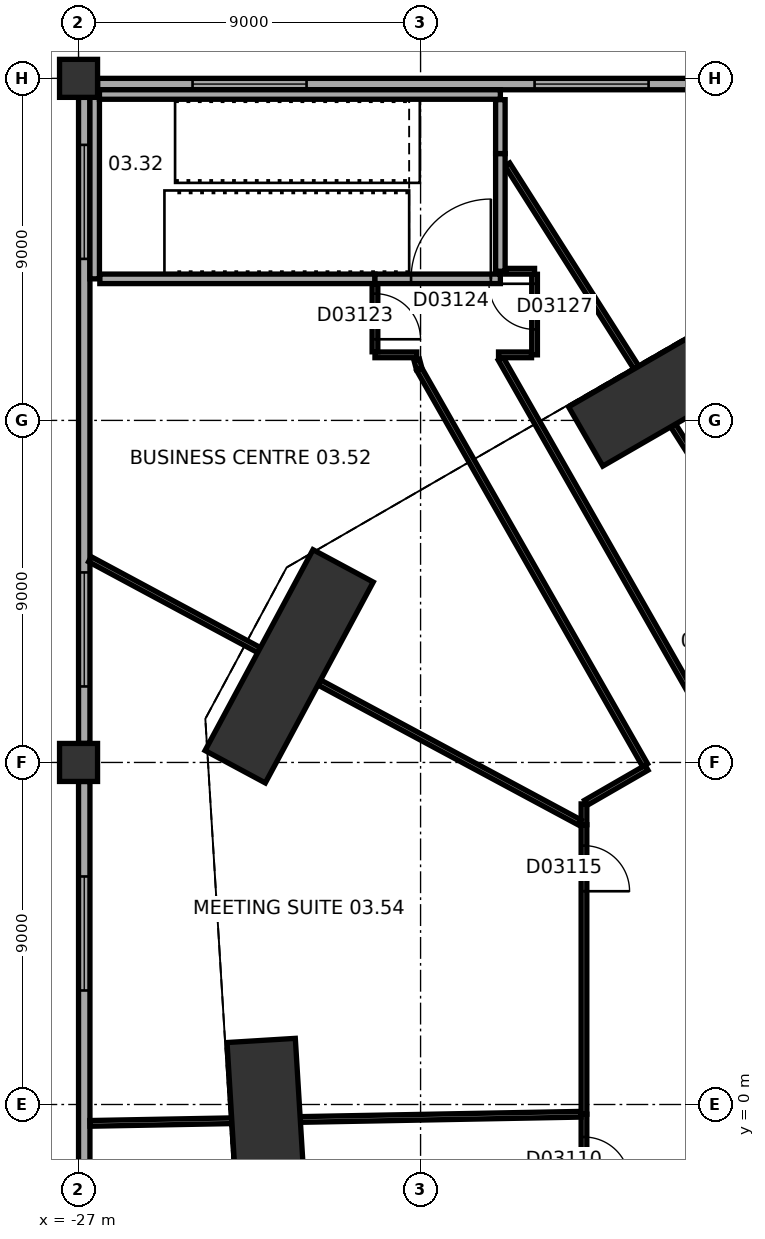
"""IFC4 building model, lengths in metres.
Left out: names, types, materials, properties, quantities, classifications, styles, units other than length and angle.
Written with IfcOpenShell. Run it as: python <this file> out.ifc"""

import sys

from ifc_helpers import new_model, si_unit, direction, frame, frame_2d, origin, origin_2d, place, context, subcontext, project, spatial, rectangle, extrude, element, fill, save


model = new_model("IFC4")
c1 = context("Model", 3, precision=1e-05, world=origin(), true_north=direction((0.0, 1.0)))
c2 = subcontext(c1, "Body", "Model", "MODEL_VIEW")
j1 = project(units=[si_unit("LENGTHUNIT", "METRE"), si_unit("PLANEANGLEUNIT", "RADIAN")], contexts=[c1])
p1 = place(None, origin())
s1 = spatial("IfcSite", under=j1, at=p1, CompositionType="ELEMENT")
p2 = place(p1, origin())
s2 = spatial("IfcBuilding", under=s1, at=p2, CompositionType="ELEMENT")
p3 = place(p2, frame((0.0, 0.0, 21.0)))
s3 = spatial("IfcBuildingStorey", under=s2, at=p3, CompositionType="ELEMENT", Elevation=21.0)
p4 = place(p3, frame((-11.837, 18.627, 0.0), z_axis=(0.0, 0.0, 1.0), x_axis=(-0.866028021766, -0.499995465495, 0.0)))
e1 = element("IfcColumn", 1, at=p4, inside=s3, PredefinedType="COLUMN", context=c2, shape_type="SweptSolid", body=[
    extrude(rectangle(XDim=4.2, YDim=1.8, at=origin_2d()), origin(), (0.0, 0.0, 1.0), 8.0),
])
p5 = place(p3, frame((-21.458, 11.53, 0.0), z_axis=(0.0, 0.0, 1.0), x_axis=(-0.473316592293, -0.880892390397, 0.0)))
e2 = element("IfcColumn", 2, at=p5, inside=s3, PredefinedType="COLUMN", context=c2, shape_type="SweptSolid", body=[
    extrude(rectangle(XDim=6.0, YDim=1.8, at=origin_2d()), origin(), (0.0, 0.0, 1.0), 8.0),
])
p6 = place(p3, frame((-22.066, -0.411, 0.0), z_axis=(0.0, 0.0, 1.0), x_axis=(0.061046797461, -0.99813490497, 0.0)))
e3 = element("IfcColumn", 3, at=p6, inside=s3, PredefinedType="COLUMN", context=c2, shape_type="SweptSolid", body=[
    extrude(rectangle(XDim=4.2, YDim=1.8, at=origin_2d()), origin(), (0.0, 0.0, 1.0), 8.0),
])
for number, where, z_axis, x_axis in (
    (4, (-27.0, 9.0, 0.0), (0.0, 0.0, 1.0), (1.0, 0.0, 0.0)),
    (5, (-27.0, 27.0, 0.0), (0.0, 0.0, 1.0), (1.0, 0.0, 0.0)),
):
    element("IfcColumn", number, at=place(p3, frame(where, z_axis=z_axis, x_axis=x_axis)), inside=s3, PredefinedType="COLUMN", context=c2, shape_type="SweptSolid", body=[
        extrude(rectangle(XDim=1.0, YDim=1.0, at=origin_2d()), origin(), (0.0, 0.0, 1.0), 8.0),
    ])
p7 = place(p3, frame((-9.5, 26.85, 0.0), z_axis=(0.0, 0.0, 1.0), x_axis=(-1.0, 0.0, 0.0)))
e6 = element("IfcWall", 6, at=p7, inside=s3, PredefinedType="STANDARD", context=c2, shape_type="SweptSolid", body=[
    extrude(rectangle(XDim=17.0, YDim=0.3, at=frame_2d((8.5, 0.0))), origin(), (0.0, 0.0, 1.0), 6.5),
])
p8 = place(p7, frame((2.5, 0.0, 1.0)))
e7 = element("IfcOpeningElement", 7, at=p8, cuts=e6, PredefinedType="OPENING", context=c2, shape_type="SweptSolid", body=[
    extrude(rectangle(XDim=3.0, YDim=4.0, at=frame_2d((1.5, 2.0))), frame((0.0, 0.16, 0.0), z_axis=(0.0, -1.0, 0.0), x_axis=(1.0, 0.0, 0.0)), (0.0, 0.0, 1.0), 0.32),
])
p9 = place(p7, frame((11.5, 0.0, 1.0)))
e8 = element("IfcOpeningElement", 8, at=p9, cuts=e6, PredefinedType="OPENING", context=c2, shape_type="SweptSolid", body=[
    extrude(rectangle(XDim=3.0, YDim=4.0, at=frame_2d((1.5, 2.0))), frame((0.0, 0.16, 0.0), z_axis=(0.0, -1.0, 0.0), x_axis=(1.0, 0.0, 0.0)), (0.0, 0.0, 1.0), 0.32),
])
p10 = place(p3, frame((-26.85, 26.5, 0.0), z_axis=(0.0, 0.0, 1.0), x_axis=(0.0, -1.0, 0.0)))
e9 = element("IfcWall", 9, at=p10, inside=s3, PredefinedType="STANDARD", context=c2, shape_type="SweptSolid", body=[
    extrude(rectangle(XDim=17.0, YDim=0.3, at=frame_2d((8.5, 0.0))), origin(), (0.0, 0.0, 1.0), 6.5),
])
p11 = place(p10, frame((1.25, 0.0, 1.0)))
e10 = element("IfcOpeningElement", 10, at=p11, cuts=e9, PredefinedType="OPENING", context=c2, shape_type="SweptSolid", body=[
    extrude(rectangle(XDim=3.0, YDim=4.0, at=frame_2d((1.5, 2.0))), frame((0.0, 0.16, 0.0), z_axis=(0.0, -1.0, 0.0), x_axis=(1.0, 0.0, 0.0)), (0.0, 0.0, 1.0), 0.32),
])
p12 = place(p10, frame((12.5, 0.0, 1.0)))
e11 = element("IfcOpeningElement", 11, at=p12, cuts=e9, PredefinedType="OPENING", context=c2, shape_type="SweptSolid", body=[
    extrude(rectangle(XDim=3.0, YDim=4.0, at=frame_2d((1.5, 2.0))), frame((0.0, 0.16, 0.0), z_axis=(0.0, -1.0, 0.0), x_axis=(1.0, 0.0, 0.0)), (0.0, 0.0, 1.0), 0.32),
])
p13 = place(p3, frame((-26.85, 8.5, 0.0), z_axis=(0.0, 0.0, 1.0), x_axis=(0.0, -1.0, 0.0)))
e12 = element("IfcWall", 12, at=p13, inside=s3, PredefinedType="STANDARD", context=c2, shape_type="SweptSolid", body=[
    extrude(rectangle(XDim=17.0, YDim=0.3, at=frame_2d((8.5, 0.0))), origin(), (0.0, 0.0, 1.0), 6.5),
])
p14 = place(p13, frame((2.5, 0.0, 1.0)))
e13 = element("IfcOpeningElement", 13, at=p14, cuts=e12, PredefinedType="OPENING", context=c2, shape_type="SweptSolid", body=[
    extrude(rectangle(XDim=3.0, YDim=4.0, at=frame_2d((1.5, 2.0))), frame((0.0, 0.16, 0.0), z_axis=(0.0, -1.0, 0.0), x_axis=(1.0, 0.0, 0.0)), (0.0, 0.0, 1.0), 0.32),
])
p15 = place(p13, frame((11.5, 0.0, 1.0)))
e14 = element("IfcOpeningElement", 14, at=p15, cuts=e12, PredefinedType="OPENING", context=c2, shape_type="SweptSolid", body=[
    extrude(rectangle(XDim=3.0, YDim=4.0, at=frame_2d((1.5, 2.0))), frame((0.0, 0.16, 0.0), z_axis=(0.0, -1.0, 0.0), x_axis=(1.0, 0.0, 0.0)), (0.0, 0.0, 1.0), 0.32),
])
p16 = place(p3, frame((-13.7, -7.909, 0.0), z_axis=(0.0, 0.0, 1.0), x_axis=(0.0, 1.0, 0.0)))
e15 = element("IfcWall", 15, at=p16, inside=s3, PredefinedType="PARTITIONING", context=c2, shape_type="SweptSolid", body=[
    extrude(rectangle(XDim=7.655, YDim=0.15, at=frame_2d((3.827, 0.0))), origin(), (0.0, 0.0, 1.0), 7.7),
])
p17 = place(p16, frame((5.854, 0.0, 0.0)))
e16 = element("IfcOpeningElement", 16, at=p17, cuts=e15, PredefinedType="OPENING", context=c2, shape_type="SweptSolid", body=[
    extrude(rectangle(XDim=1.2, YDim=2.1, at=frame_2d((0.6, 1.05))), frame((0.0, 0.085, 0.0), z_axis=(0.0, -1.0, 0.0), x_axis=(1.0, 0.0, 0.0)), (0.0, 0.0, 1.0), 0.17),
])
p18 = place(p3, frame((-22.967, -0.427, 0.0), z_axis=(0.0, 0.0, 1.0), x_axis=(-0.999826372694, -0.018633959993, 0.0)))
e17 = element("IfcWall", 17, at=p18, inside=s3, PredefinedType="PARTITIONING", context=c2, shape_type="SweptSolid", body=[
    extrude(rectangle(XDim=3.734, YDim=0.15, at=frame_2d((1.867, 0.0))), origin(), (0.0, 0.0, 1.0), 7.7),
])
p19 = place(p3, frame((-13.78, -0.257, 0.0), z_axis=(0.0, 0.0, 1.0), x_axis=(-0.999826849708, -0.018608347649, 0.0)))
e18 = element("IfcWall", 18, at=p19, inside=s3, PredefinedType="PARTITIONING", context=c2, shape_type="SweptSolid", body=[
    extrude(rectangle(XDim=7.386, YDim=0.15, at=frame_2d((3.693, 0.0))), origin(), (0.0, 0.0, 1.0), 7.7),
])
p20 = place(p3, frame((-13.7, -0.255, 0.0), z_axis=(0.0, 0.0, 1.0), x_axis=(0.0, 1.0, 0.0)))
e19 = element("IfcWall", 19, at=p20, inside=s3, PredefinedType="PARTITIONING", context=c2, shape_type="SweptSolid", body=[
    extrude(rectangle(XDim=7.616, YDim=0.15, at=frame_2d((3.808, 0.0))), origin(), (0.0, 0.0, 1.0), 7.7),
])
p21 = place(p20, frame((5.866, 0.0, 0.0)))
e20 = element("IfcOpeningElement", 20, at=p21, cuts=e19, PredefinedType="OPENING", context=c2, shape_type="SweptSolid", body=[
    extrude(rectangle(XDim=1.2, YDim=2.1, at=frame_2d((0.6, 1.05))), frame((0.0, 0.085, 0.0), z_axis=(0.0, -1.0, 0.0), x_axis=(1.0, 0.0, 0.0)), (0.0, 0.0, 1.0), 0.17),
])
p22 = place(p3, frame((-13.7, 7.362, 0.0), z_axis=(0.0, 0.0, 1.0), x_axis=(0.0, 1.0, 0.0)))
e21 = element("IfcWall", 21, at=p22, inside=s3, PredefinedType="PARTITIONING", context=c2, shape_type="SweptSolid", body=[
    extrude(rectangle(XDim=0.548, YDim=0.15, at=frame_2d((0.274, 0.0))), origin(), (0.0, 0.0, 1.0), 7.7),
])
p23 = place(p3, frame((-13.806, 7.418, 0.0), z_axis=(0.0, 0.0, 1.0), x_axis=(-0.880891557551, 0.473318142305, 0.0)))
e22 = element("IfcWall", 22, at=p23, inside=s3, PredefinedType="PARTITIONING", context=c2, shape_type="SweptSolid", body=[
    extrude(rectangle(XDim=7.787, YDim=0.15, at=frame_2d((3.894, 0.0))), origin(), (0.0, 0.0, 1.0), 7.7),
])
p24 = place(p3, frame((-13.648, 7.939, 0.0), z_axis=(0.0, 0.0, 1.0), x_axis=(0.866024486176, 0.500001589341, 0.0)))
e23 = element("IfcWall", 23, at=p24, inside=s3, PredefinedType="PARTITIONING", context=c2, shape_type="SweptSolid", body=[
    extrude(rectangle(XDim=1.842, YDim=0.15, at=frame_2d((0.921, 0.0))), origin(), (0.0, 0.0, 1.0), 7.7),
])
p25 = place(p3, frame((-12.092, 8.93, 0.0), z_axis=(0.0, 0.0, 1.0), x_axis=(-0.495564220718, 0.868571299977, 0.0)))
e24 = element("IfcWall", 24, at=p25, inside=s3, PredefinedType="PARTITIONING", context=c2, shape_type="SweptSolid", body=[
    extrude(rectangle(XDim=11.988, YDim=0.15, at=frame_2d((5.994, 0.0))), origin(), (0.0, 0.0, 1.0), 7.7),
])
p26 = place(p3, frame((-7.397, 11.641, 0.0), z_axis=(0.0, 0.0, 1.0), x_axis=(-0.536312130721, 0.844019726334, 0.0)))
e25 = element("IfcWall", 25, at=p26, inside=s3, PredefinedType="PARTITIONING", context=c2, shape_type="SweptSolid", body=[
    extrude(rectangle(XDim=7.376, YDim=0.15, at=frame_2d((3.688, 0.0))), origin(), (0.0, 0.0, 1.0), 7.7),
])
p27 = place(p3, frame((-22.251, 11.956, 0.0), z_axis=(0.0, 0.0, 1.0), x_axis=(-0.880902248523, 0.473298244817, 0.0)))
e26 = element("IfcWall", 26, at=p27, inside=s3, PredefinedType="PARTITIONING", context=c2, shape_type="SweptSolid", body=[
    extrude(rectangle(XDim=5.051, YDim=0.15, at=frame_2d((2.525, 0.0))), origin(), (0.0, 0.0, 1.0), 7.7),
])
p28 = place(p3, frame((-18.038, 19.362, 0.0), z_axis=(0.0, 0.0, 1.0), x_axis=(-0.257536433885, 0.966268588552, 0.0)))
e27 = element("IfcWall", 27, at=p28, inside=s3, PredefinedType="PARTITIONING", context=c2, shape_type="SweptSolid", body=[
    extrude(rectangle(XDim=0.241, YDim=0.15, at=frame_2d((0.12, 0.0))), origin(), (0.0, 0.0, 1.0), 7.7),
])
p29 = place(p3, frame((-12.32, 19.387, 0.0), z_axis=(0.0, 0.0, 1.0), x_axis=(-0.536309341483, 0.844021498682, 0.0)))
e28 = element("IfcWall", 28, at=p29, inside=s3, PredefinedType="PARTITIONING", context=c2, shape_type="SweptSolid", body=[
    extrude(rectangle(XDim=6.335, YDim=0.15, at=frame_2d((3.168, 0.0))), origin(), (0.0, 0.0, 1.0), 7.7),
])
p30 = place(p3, frame((-15.889, 19.621, 0.0), z_axis=(0.0, 0.0, 1.0), x_axis=(0.495540263005, -0.868584968636, 0.0)))
e29 = element("IfcWall", 29, at=p30, inside=s3, PredefinedType="PARTITIONING", context=c2, shape_type="SweptSolid", body=[
    extrude(rectangle(XDim=11.157, YDim=0.15, at=frame_2d((5.579, 0.0))), origin(), (0.0, 0.0, 1.0), 7.7),
])
p31 = place(p3, frame((-18.1, 19.725, 0.0), z_axis=(0.0, 0.0, 1.0), x_axis=(-1.0, 0.0, 0.0)))
e30 = element("IfcWall", 30, at=p31, inside=s3, PredefinedType="PARTITIONING", context=c2, shape_type="SweptSolid", body=[
    extrude(rectangle(XDim=1.1, YDim=0.15, at=frame_2d((0.55, 0.0))), origin(), (0.0, 0.0, 1.0), 7.7),
])
p32 = place(p3, frame((-15.08, 19.725, 0.0), z_axis=(0.0, 0.0, 1.0), x_axis=(-1.0, 0.0, 0.0)))
e31 = element("IfcWall", 31, at=p32, inside=s3, PredefinedType="PARTITIONING", context=c2, shape_type="SweptSolid", body=[
    extrude(rectangle(XDim=0.868, YDim=0.15, at=frame_2d((0.434, 0.0))), origin(), (0.0, 0.0, 1.0), 7.7),
])
p33 = place(p3, frame((-19.2, 19.805, 0.0), z_axis=(0.0, 0.0, 1.0), x_axis=(0.0, 1.0, 0.0)))
e32 = element("IfcWall", 32, at=p33, inside=s3, PredefinedType="PARTITIONING", context=c2, shape_type="SweptSolid", body=[
    extrude(rectangle(XDim=1.78, YDim=0.15, at=frame_2d((0.89, 0.0))), origin(), (0.0, 0.0, 1.0), 7.7),
])
p34 = place(p33, frame((0.33, 0.0, 0.0)))
e33 = element("IfcOpeningElement", 33, at=p34, cuts=e32, PredefinedType="OPENING", context=c2, shape_type="SweptSolid", body=[
    extrude(rectangle(XDim=1.2, YDim=2.1, at=frame_2d((0.6, 1.05))), frame((0.0, 0.085, 0.0), z_axis=(0.0, -1.0, 0.0), x_axis=(1.0, 0.0, 0.0)), (0.0, 0.0, 1.0), 0.17),
])
p35 = place(p3, frame((-19.2, 21.725, 0.0), z_axis=(0.0, 0.0, 1.0), x_axis=(-1.0, 0.0, 0.0)))
e34 = element("IfcWall", 34, at=p35, inside=s3, PredefinedType="SOLIDWALL", context=c2, shape_type="SweptSolid", body=[
    extrude(rectangle(XDim=7.24, YDim=0.25, at=frame_2d((3.62, 0.0))), origin(), (0.0, 0.0, 1.0), 7.7),
])
p36 = place(p3, frame((-15.9, 21.725, 0.0), z_axis=(0.0, 0.0, 1.0), x_axis=(-1.0, 0.0, 0.0)))
e35 = element("IfcWall", 35, at=p36, inside=s3, PredefinedType="SOLIDWALL", context=c2, shape_type="SweptSolid", body=[
    extrude(rectangle(XDim=3.3, YDim=0.25, at=frame_2d((1.65, 0.0))), origin(), (0.0, 0.0, 1.0), 7.7),
])
p37 = place(p36, frame((0.25, 0.0, 0.0)))
e36 = element("IfcOpeningElement", 36, at=p37, cuts=e35, PredefinedType="OPENING", context=c2, shape_type="SweptSolid", body=[
    extrude(rectangle(XDim=2.1, YDim=2.4, at=frame_2d((1.05, 1.2))), frame((0.0, 0.135, 0.0), z_axis=(0.0, -1.0, 0.0), x_axis=(1.0, 0.0, 0.0)), (0.0, 0.0, 1.0), 0.27),
])
p38 = place(p3, frame((-15.0, 21.845, 0.0), z_axis=(0.0, 0.0, 1.0), x_axis=(0.0, -1.0, 0.0)))
e37 = element("IfcWall", 37, at=p38, inside=s3, PredefinedType="PARTITIONING", context=c2, shape_type="SweptSolid", body=[
    extrude(rectangle(XDim=2.12, YDim=0.15, at=frame_2d((1.06, 0.0))), origin(), (0.0, 0.0, 1.0), 7.7),
])
p39 = place(p38, frame((0.25, 0.0, 0.0)))
e38 = element("IfcOpeningElement", 38, at=p39, cuts=e37, PredefinedType="OPENING", context=c2, shape_type="SweptSolid", body=[
    extrude(rectangle(XDim=1.2, YDim=2.1, at=frame_2d((0.6, 1.05))), frame((0.0, 0.085, 0.0), z_axis=(0.0, -1.0, 0.0), x_axis=(1.0, 0.0, 0.0)), (0.0, 0.0, 1.0), 0.17),
])
p40 = place(p3, frame((-15.76, 21.925, 0.0), z_axis=(0.0, 0.0, 1.0), x_axis=(1.0, 0.0, 0.0)))
e39 = element("IfcWall", 39, at=p40, inside=s3, PredefinedType="PARTITIONING", context=c2, shape_type="SweptSolid", body=[
    extrude(rectangle(XDim=0.76, YDim=0.15, at=frame_2d((0.38, 0.0))), origin(), (0.0, 0.0, 1.0), 7.7),
])
p41 = place(p3, frame((-15.9, 25.021, 0.0), z_axis=(0.0, 0.0, 1.0), x_axis=(0.0, -1.0, 0.0)))
e40 = element("IfcWall", 40, at=p41, inside=s3, PredefinedType="SOLIDWALL", context=c2, shape_type="SweptSolid", body=[
    extrude(rectangle(XDim=3.096, YDim=0.25, at=frame_2d((1.548, 0.0))), origin(), (0.0, 0.0, 1.0), 7.7),
])
p42 = place(p3, frame((-15.9, 26.44, 0.0), z_axis=(0.0, 0.0, 1.0), x_axis=(0.0, -1.0, 0.0)))
e41 = element("IfcWall", 41, at=p42, inside=s3, PredefinedType="SOLIDWALL", context=c2, shape_type="SweptSolid", body=[
    extrude(rectangle(XDim=1.418, YDim=0.25, at=frame_2d((0.709, 0.0))), origin(), (0.0, 0.0, 1.0), 7.7),
])
p43 = place(p3, frame((-26.575, 21.725, 0.0), z_axis=(0.0, 0.0, 1.0), x_axis=(0.0, 1.0, 0.0)))
e42 = element("IfcWall", 42, at=p43, inside=s3, PredefinedType="SOLIDWALL", context=c2, shape_type="SweptSolid", body=[
    extrude(rectangle(XDim=4.975, YDim=0.25, at=frame_2d((2.487, 0.0))), origin(), (0.0, 0.0, 1.0), 7.7),
])
p44 = place(p3, frame((-26.45, 26.575, 0.0), z_axis=(0.0, 0.0, 1.0), x_axis=(1.0, 0.0, 0.0)))
e43 = element("IfcWall", 43, at=p44, inside=s3, PredefinedType="SOLIDWALL", context=c2, shape_type="SweptSolid", body=[
    extrude(rectangle(XDim=10.55, YDim=0.25, at=frame_2d((5.275, 0.0))), origin(), (0.0, 0.0, 1.0), 7.7),
])
p45 = place(p8, origin())
e44 = element("IfcWindow", 44, at=p45, inside=s3, PartitioningType="SINGLE_PANEL", PredefinedType="WINDOW", context=c2, shape_type="SweptSolid", body=[
    extrude(rectangle(XDim=3.0, YDim=4.0, at=frame_2d((1.5, 2.0))), frame((0.0, 0.03, 0.0), z_axis=(0.0, -1.0, 0.0), x_axis=(1.0, 0.0, 0.0)), (0.0, 0.0, 1.0), 0.06),
])
fill(e7, e44)
p46 = place(p9, origin())
e45 = element("IfcWindow", 45, at=p46, inside=s3, PartitioningType="SINGLE_PANEL", PredefinedType="WINDOW", context=c2, shape_type="SweptSolid", body=[
    extrude(rectangle(XDim=3.0, YDim=4.0, at=frame_2d((1.5, 2.0))), frame((0.0, 0.03, 0.0), z_axis=(0.0, -1.0, 0.0), x_axis=(1.0, 0.0, 0.0)), (0.0, 0.0, 1.0), 0.06),
])
fill(e8, e45)
p47 = place(p11, origin())
e46 = element("IfcWindow", 46, at=p47, inside=s3, PartitioningType="SINGLE_PANEL", PredefinedType="WINDOW", context=c2, shape_type="SweptSolid", body=[
    extrude(rectangle(XDim=3.0, YDim=4.0, at=frame_2d((1.5, 2.0))), frame((0.0, 0.03, 0.0), z_axis=(0.0, -1.0, 0.0), x_axis=(1.0, 0.0, 0.0)), (0.0, 0.0, 1.0), 0.06),
])
fill(e10, e46)
p48 = place(p12, origin())
e47 = element("IfcWindow", 47, at=p48, inside=s3, PartitioningType="SINGLE_PANEL", PredefinedType="WINDOW", context=c2, shape_type="SweptSolid", body=[
    extrude(rectangle(XDim=3.0, YDim=4.0, at=frame_2d((1.5, 2.0))), frame((0.0, 0.03, 0.0), z_axis=(0.0, -1.0, 0.0), x_axis=(1.0, 0.0, 0.0)), (0.0, 0.0, 1.0), 0.06),
])
fill(e11, e47)
p49 = place(p14, origin())
e48 = element("IfcWindow", 48, at=p49, inside=s3, PartitioningType="SINGLE_PANEL", PredefinedType="WINDOW", context=c2, shape_type="SweptSolid", body=[
    extrude(rectangle(XDim=3.0, YDim=4.0, at=frame_2d((1.5, 2.0))), frame((0.0, 0.03, 0.0), z_axis=(0.0, -1.0, 0.0), x_axis=(1.0, 0.0, 0.0)), (0.0, 0.0, 1.0), 0.06),
])
fill(e13, e48)
p50 = place(p17, origin())
e49 = element("IfcDoor", 49, at=p50, inside=s3, OperationType="SINGLE_SWING_LEFT", PredefinedType="DOOR", context=c2, shape_type="SweptSolid", body=[
    extrude(rectangle(XDim=1.2, YDim=2.1, at=frame_2d((0.6, 1.05))), frame((0.0, 0.025, 0.0), z_axis=(0.0, -1.0, 0.0), x_axis=(1.0, 0.0, 0.0)), (0.0, 0.0, 1.0), 0.05),
])
fill(e16, e49)
p51 = place(p21, origin())
e50 = element("IfcDoor", 50, at=p51, inside=s3, OperationType="SINGLE_SWING_LEFT", PredefinedType="DOOR", context=c2, shape_type="SweptSolid", body=[
    extrude(rectangle(XDim=1.2, YDim=2.1, at=frame_2d((0.6, 1.05))), frame((0.0, 0.025, 0.0), z_axis=(0.0, -1.0, 0.0), x_axis=(1.0, 0.0, 0.0)), (0.0, 0.0, 1.0), 0.05),
])
fill(e20, e50)
p52 = place(p34, origin())
e51 = element("IfcDoor", 51, at=p52, inside=s3, OperationType="SINGLE_SWING_LEFT", PredefinedType="DOOR", context=c2, shape_type="SweptSolid", body=[
    extrude(rectangle(XDim=1.2, YDim=2.1, at=frame_2d((0.6, 1.05))), frame((0.0, 0.025, 0.0), z_axis=(0.0, -1.0, 0.0), x_axis=(1.0, 0.0, 0.0)), (0.0, 0.0, 1.0), 0.05),
])
fill(e33, e51)
p53 = place(p37, frame((2.1, 0.0, 0.0), z_axis=(0.0, 0.0, 1.0), x_axis=(-1.0, 0.0, 0.0)))
e52 = element("IfcDoor", 52, at=p53, inside=s3, OperationType="DOUBLE_DOOR_SINGLE_SWING", PredefinedType="DOOR", context=c2, shape_type="SweptSolid", body=[
    extrude(rectangle(XDim=2.1, YDim=2.4, at=frame_2d((1.05, 1.2))), frame((0.0, 0.025, 0.0), z_axis=(0.0, -1.0, 0.0), x_axis=(1.0, 0.0, 0.0)), (0.0, 0.0, 1.0), 0.05),
])
fill(e36, e52)
p54 = place(p39, origin())
e53 = element("IfcDoor", 53, at=p54, inside=s3, OperationType="SINGLE_SWING_LEFT", PredefinedType="DOOR", context=c2, shape_type="SweptSolid", body=[
    extrude(rectangle(XDim=1.2, YDim=2.1, at=frame_2d((0.6, 1.05))), frame((0.0, 0.025, 0.0), z_axis=(0.0, -1.0, 0.0), x_axis=(1.0, 0.0, 0.0)), (0.0, 0.0, 1.0), 0.05),
])
fill(e38, e53)
save(model, sys.argv[1])
